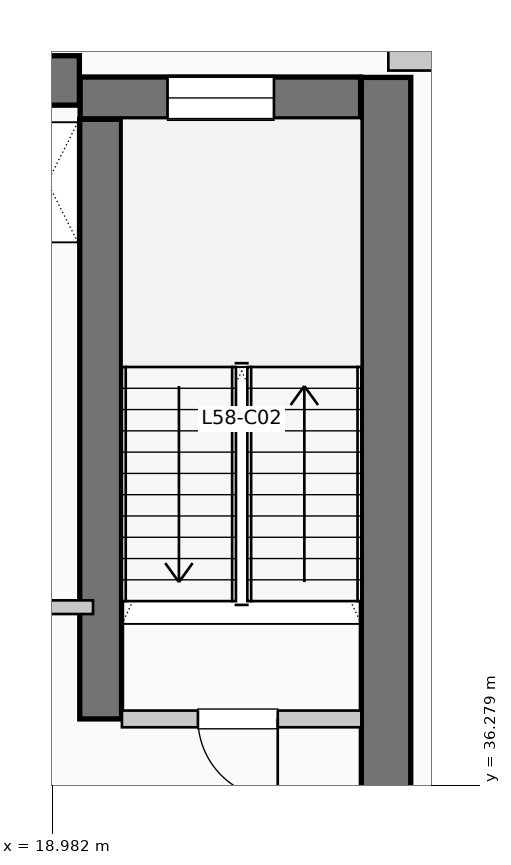
"""IFC4 building model, lengths in metres.
Left out: names, types, materials, properties, quantities, classifications, styles, units other than length and angle.
Written with IfcOpenShell. Run it as: python <this file> out.ifc"""

import sys

from ifc_helpers import new_model, si_unit, direction, frame, frame_2d, origin, place, context, subcontext, project, spatial, rectangle, extrude, element, fill, save


model = new_model("IFC4")
c1 = context("Model", 3, precision=1e-05, world=origin(), true_north=direction((0.0, 1.0)))
c2 = subcontext(c1, "Body", "Model", "MODEL_VIEW")
j1 = project(units=[si_unit("LENGTHUNIT", "METRE"), si_unit("PLANEANGLEUNIT", "RADIAN")], contexts=[c1])
p1 = place(None, origin())
s1 = spatial("IfcSite", under=j1, at=p1, CompositionType="ELEMENT")
p2 = place(p1, origin())
s2 = spatial("IfcBuilding", under=s1, at=p2, CompositionType="ELEMENT")
p3 = place(p2, frame((0.0, 0.0, 239.58)))
s3 = spatial("IfcBuildingStorey", under=s2, at=p3, CompositionType="ELEMENT", Elevation=239.58)
p4 = place(p3, frame((5.36, 45.55, 0.0), z_axis=(0.0, 0.0, 1.0), x_axis=(1.0, 0.0, 0.0)))
e1 = element("IfcWall", 1, at=p4, inside=s3, PredefinedType="SHEAR", context=c2, shape_type="SweptSolid", body=[
    extrude(rectangle(XDim=13.98, YDim=0.65, at=frame_2d((6.99, 0.0))), origin(), (0.0, 0.0, 1.0), 3.96),
])
p5 = place(p3, frame((23.375, 34.95, 0.0), z_axis=(0.0, 0.0, 1.0), x_axis=(0.0, 1.0, 0.0)))
e2 = element("IfcWall", 2, at=p5, inside=s3, PredefinedType="SHEAR", context=c2, shape_type="SweptSolid", body=[
    extrude(rectangle(XDim=10.64, YDim=0.65, at=frame_2d((5.32, 0.0))), origin(), (0.0, 0.0, 1.0), 3.96),
])
p6 = place(p3, frame((19.62, 37.15, 0.0), z_axis=(0.0, 0.0, 1.0), x_axis=(0.0, 1.0, 0.0)))
e3 = element("IfcWall", 3, at=p6, inside=s3, PredefinedType="SHEAR", context=c2, shape_type="SweptSolid", body=[
    extrude(rectangle(XDim=7.89, YDim=0.55, at=frame_2d((3.945, 0.0))), origin(), (0.0, 0.0, 1.0), 3.96),
])
p7 = place(p3, frame((19.35, 45.32, 0.0), z_axis=(0.0, 0.0, 1.0), x_axis=(1.0, 0.0, 0.0)))
e4 = element("IfcWall", 4, at=p7, inside=s3, PredefinedType="SHEAR", context=c2, shape_type="SweptSolid", body=[
    extrude(rectangle(XDim=3.69, YDim=0.55, at=frame_2d((1.845, 0.0))), origin(), (0.0, 0.0, 1.0), 3.96),
])
p8 = place(p7, frame((1.15, 0.0, 1.05)))
e5 = element("IfcOpeningElement", 5, at=p8, cuts=e4, PredefinedType="OPENING", context=c2, shape_type="SweptSolid", body=[
    extrude(rectangle(XDim=1.4, YDim=1.8, at=frame_2d((0.7, 0.9))), frame((0.0, 0.285, 0.0), z_axis=(0.0, -1.0, 0.0), x_axis=(1.0, 0.0, 0.0)), (0.0, 0.0, 1.0), 0.57),
])
p9 = place(p3, frame((47.145, 45.84, 0.0), z_axis=(0.0, 0.0, 1.0), x_axis=(-1.0, 0.0, 0.0)))
e6 = element("IfcWall", 6, at=p9, inside=s3, PredefinedType="SOLIDWALL", context=c2, shape_type="SweptSolid", body=[
    extrude(rectangle(XDim=23.74, YDim=0.32, at=frame_2d((11.87, 0.0))), origin(), (0.0, 0.0, 1.0), 3.71),
])
p10 = place(p3, frame((19.9, 37.15, 0.0), z_axis=(0.0, 0.0, 1.0), x_axis=(1.0, 0.0, 0.0)))
e7 = element("IfcWall", 7, at=p10, inside=s3, PredefinedType="PARTITIONING", context=c2, shape_type="SweptSolid", body=[
    extrude(rectangle(XDim=3.15, YDim=0.22, at=frame_2d((1.575, 0.0))), origin(), (0.0, 0.0, 1.0), 3.71),
])
p11 = place(p10, frame((2.05, 0.0, 0.0), z_axis=(0.0, 0.0, 1.0), x_axis=(-1.0, 0.0, 0.0)))
e8 = element("IfcOpeningElement", 8, at=p11, cuts=e7, PredefinedType="OPENING", context=c2, shape_type="SweptSolid", body=[
    extrude(rectangle(XDim=1.05, YDim=2.15, at=frame_2d((0.525, 1.075))), frame((0.0, 0.12, 0.0), z_axis=(0.0, -1.0, 0.0), x_axis=(1.0, 0.0, 0.0)), (0.0, 0.0, 1.0), 0.24),
])
p12 = place(p3, frame((17.68, 38.62, 0.0), z_axis=(0.0, 0.0, 1.0), x_axis=(1.0, 0.0, 0.0)))
e9 = element("IfcWall", 9, at=p12, inside=s3, PredefinedType="PARTITIONING", context=c2, shape_type="SweptSolid", body=[
    extrude(rectangle(XDim=1.84, YDim=0.18, at=frame_2d((0.92, 0.0))), origin(), (0.0, 0.0, 1.0), 3.71),
])
p13 = place(p12, frame((0.24, 0.0, 0.0)))
e10 = element("IfcOpeningElement", 10, at=p13, cuts=e9, PredefinedType="OPENING", context=c2, shape_type="SweptSolid", body=[
    extrude(rectangle(XDim=0.92, YDim=2.1, at=frame_2d((0.46, 1.05))), frame((0.0, 0.1, 0.0), z_axis=(0.0, -1.0, 0.0), x_axis=(1.0, 0.0, 0.0)), (0.0, 0.0, 1.0), 0.2),
])
p14 = place(p8, origin())
e11 = element("IfcWindow", 11, at=p14, inside=s3, PartitioningType="SINGLE_PANEL", PredefinedType="WINDOW", context=c2, shape_type="SweptSolid", body=[
    extrude(rectangle(XDim=1.4, YDim=1.8, at=frame_2d((0.7, 0.9))), frame((0.0, 0.03, 0.0), z_axis=(0.0, -1.0, 0.0), x_axis=(1.0, 0.0, 0.0)), (0.0, 0.0, 1.0), 0.06),
])
fill(e5, e11)
p15 = place(p11, origin())
e12 = element("IfcDoor", 12, at=p15, inside=s3, OperationType="SINGLE_SWING_RIGHT", PredefinedType="DOOR", context=c2, shape_type="SweptSolid", body=[
    extrude(rectangle(XDim=1.05, YDim=2.15, at=frame_2d((0.525, 1.075))), frame((0.0, 0.025, 0.0), z_axis=(0.0, -1.0, 0.0), x_axis=(1.0, 0.0, 0.0)), (0.0, 0.0, 1.0), 0.05),
])
fill(e8, e12)
save(model, sys.argv[1])
